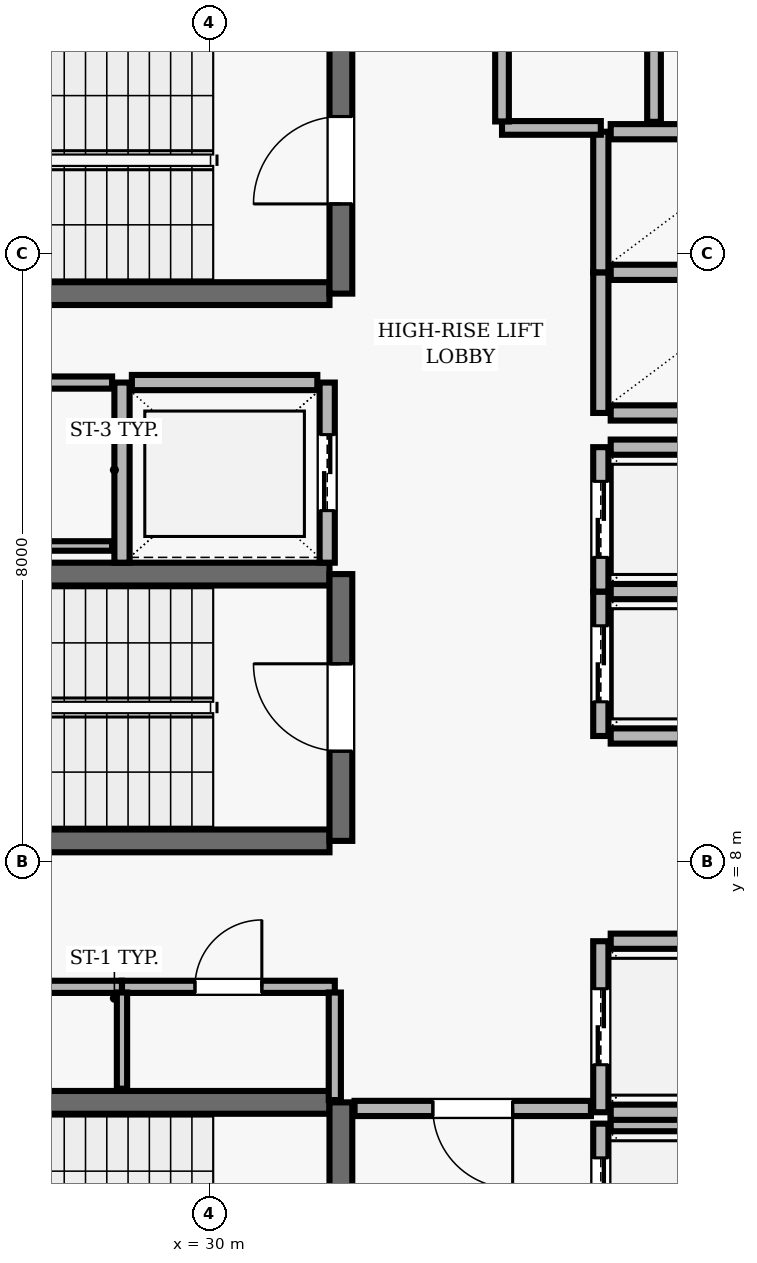
"""IFC4 building model, lengths in metres.
Left out: names, types, materials, properties, quantities, classifications, styles, units other than length and angle.
Written with IfcOpenShell. Run it as: python <this file> out.ifc"""

import sys

from ifc_helpers import new_model, si_unit, direction, frame, frame_2d, origin, place, context, subcontext, project, spatial, rectangle, extrude, element, fill, save


model = new_model("IFC4")
c1 = context("Model", 3, precision=1e-05, world=origin(), true_north=direction((0.0, 1.0)))
c2 = subcontext(c1, "Body", "Model", "MODEL_VIEW")
j1 = project(units=[si_unit("LENGTHUNIT", "METRE"), si_unit("PLANEANGLEUNIT", "RADIAN")], contexts=[c1])
p1 = place(None, origin())
s1 = spatial("IfcSite", under=j1, at=p1, CompositionType="ELEMENT")
p2 = place(p1, origin())
s2 = spatial("IfcBuilding", under=s1, at=p2, CompositionType="ELEMENT")
p3 = place(p2, frame((0.0, 0.0, 179.7)))
s3 = spatial("IfcBuildingStorey", under=s2, at=p3, CompositionType="ELEMENT", Elevation=179.7)
p4 = place(p3, frame((31.58, 4.83, 0.0), z_axis=(0.0, 0.0, 1.0), x_axis=(-1.0, 0.0, 0.0)))
e1 = element("IfcWall", 1, at=p4, inside=s3, PredefinedType="SHEAR", context=c2, shape_type="SweptSolid", body=[
    extrude(rectangle(XDim=8.36, YDim=0.3, at=frame_2d((4.18, 0.0))), origin(), (0.0, 0.0, 1.0), 3.69),
])
p5 = place(p3, frame((31.73, 0.96, 0.0), z_axis=(0.0, 0.0, 1.0), x_axis=(0.0, 1.0, 0.0)))
e2 = element("IfcWall", 2, at=p5, inside=s3, PredefinedType="SHEAR", context=c2, shape_type="SweptSolid", body=[
    extrude(rectangle(XDim=3.87, YDim=0.3, at=frame_2d((1.935, 0.0))), origin(), (0.0, 0.0, 1.0), 3.69),
])
p6 = place(p5, frame((1.54, 0.0, 0.0)))
e3 = element("IfcOpeningElement", 3, at=p6, cuts=e2, PredefinedType="OPENING", context=c2, shape_type="SweptSolid", body=[
    extrude(rectangle(XDim=1.15, YDim=2.15, at=frame_2d((0.575, 1.075))), frame((0.0, 0.16, 0.0), z_axis=(0.0, -1.0, 0.0), x_axis=(1.0, 0.0, 0.0)), (0.0, 0.0, 1.0), 0.32),
])
p7 = place(p3, frame((23.22, 15.47, 0.0), z_axis=(0.0, 0.0, 1.0), x_axis=(1.0, 0.0, 0.0)))
e4 = element("IfcWall", 4, at=p7, inside=s3, PredefinedType="SHEAR", context=c2, shape_type="SweptSolid", body=[
    extrude(rectangle(XDim=8.36, YDim=0.3, at=frame_2d((4.18, 0.0))), origin(), (0.0, 0.0, 1.0), 3.69),
])
p8 = place(p3, frame((31.73, 15.47, 0.0), z_axis=(0.0, 0.0, 1.0), x_axis=(0.0, 1.0, 0.0)))
e5 = element("IfcWall", 5, at=p8, inside=s3, PredefinedType="SHEAR", context=c2, shape_type="SweptSolid", body=[
    extrude(rectangle(XDim=3.51, YDim=0.3, at=frame_2d((1.755, 0.0))), origin(), (0.0, 0.0, 1.0), 3.69),
])
p9 = place(p8, frame((1.18, 0.0, 0.0)))
e6 = element("IfcOpeningElement", 6, at=p9, cuts=e5, PredefinedType="OPENING", context=c2, shape_type="SweptSolid", body=[
    extrude(rectangle(XDim=1.15, YDim=2.15, at=frame_2d((0.575, 1.075))), frame((0.0, 0.16, 0.0), z_axis=(0.0, -1.0, 0.0), x_axis=(1.0, 0.0, 0.0)), (0.0, 0.0, 1.0), 0.32),
])
for number, where, z_axis, x_axis in (
    (7, (31.58, 11.78, 0.0), (0.0, 0.0, 1.0), (-1.0, 0.0, 0.0)),
    (8, (23.22, 8.27, 0.0), (0.0, 0.0, 1.0), (1.0, 0.0, 0.0)),
):
    element("IfcWall", number, at=place(p3, frame(where, z_axis=z_axis, x_axis=x_axis)), inside=s3, PredefinedType="SHEAR", context=c2, shape_type="SweptSolid", body=[
        extrude(rectangle(XDim=8.36, YDim=0.3, at=frame_2d((4.18, 0.0))), origin(), (0.0, 0.0, 1.0), 3.69),
    ])
p10 = place(p3, frame((31.73, 8.27, 0.0), z_axis=(0.0, 0.0, 1.0), x_axis=(0.0, 1.0, 0.0)))
e9 = element("IfcWall", 9, at=p10, inside=s3, PredefinedType="SHEAR", context=c2, shape_type="SweptSolid", body=[
    extrude(rectangle(XDim=3.51, YDim=0.3, at=frame_2d((1.755, 0.0))), origin(), (0.0, 0.0, 1.0), 3.69),
])
p11 = place(p10, frame((1.18, 0.0, 0.0)))
e10 = element("IfcOpeningElement", 10, at=p11, cuts=e9, PredefinedType="OPENING", context=c2, shape_type="SweptSolid", body=[
    extrude(rectangle(XDim=1.15, YDim=2.15, at=frame_2d((0.575, 1.075))), frame((0.0, 0.16, 0.0), z_axis=(0.0, -1.0, 0.0), x_axis=(1.0, 0.0, 0.0)), (0.0, 0.0, 1.0), 0.32),
])
p12 = place(p3, frame((35.15, 4.55, 0.0), z_axis=(0.0, 0.0, 1.0), x_axis=(0.0, -1.0, 0.0)))
e11 = element("IfcWall", 11, at=p12, inside=s3, PredefinedType="SOLIDWALL", context=c2, shape_type="SweptSolid", body=[
    extrude(rectangle(XDim=2.1, YDim=0.2, at=frame_2d((1.05, 0.0))), origin(), (0.0, 0.0, 1.0), 3.69),
])
p13 = place(p12, frame((0.45, 0.0, 0.0)))
e12 = element("IfcOpeningElement", 12, at=p13, cuts=e11, PredefinedType="OPENING", context=c2, shape_type="SweptSolid", body=[
    extrude(rectangle(XDim=1.2, YDim=2.15, at=frame_2d((0.6, 1.075))), frame((0.0, 0.11, 0.0), z_axis=(0.0, -1.0, 0.0), x_axis=(1.0, 0.0, 0.0)), (0.0, 0.0, 1.0), 0.22),
])
p14 = place(p3, frame((37.42, 4.55, 0.0), z_axis=(0.0, 0.0, 1.0), x_axis=(-1.0, 0.0, 0.0)))
e13 = element("IfcWall", 13, at=p14, inside=s3, PredefinedType="SOLIDWALL", context=c2, shape_type="SweptSolid", body=[
    extrude(rectangle(XDim=2.14, YDim=0.2, at=frame_2d((1.07, 0.0))), origin(), (0.0, 0.0, 1.0), 3.69),
])
p15 = place(p3, frame((35.15, 6.95, 0.0), z_axis=(0.0, 0.0, 1.0), x_axis=(0.0, -1.0, 0.0)))
e14 = element("IfcWall", 14, at=p15, inside=s3, PredefinedType="SOLIDWALL", context=c2, shape_type="SweptSolid", body=[
    extrude(rectangle(XDim=2.25, YDim=0.2, at=frame_2d((1.125, 0.0))), origin(), (0.0, 0.0, 1.0), 3.69),
])
p16 = place(p15, frame((0.625, 0.0, 0.0)))
e15 = element("IfcOpeningElement", 15, at=p16, cuts=e14, PredefinedType="OPENING", context=c2, shape_type="SweptSolid", body=[
    extrude(rectangle(XDim=1.0, YDim=2.1, at=frame_2d((0.5, 1.05))), frame((0.0, 0.11, 0.0), z_axis=(0.0, -1.0, 0.0), x_axis=(1.0, 0.0, 0.0)), (0.0, 0.0, 1.0), 0.22),
])
for number, where, z_axis, x_axis in (
    (16, (35.28, 4.7, 0.0), (0.0, 0.0, 1.0), (1.0, 0.0, 0.0)),
    (17, (37.42, 6.95, 0.0), (0.0, 0.0, 1.0), (-1.0, 0.0, 0.0)),
):
    element("IfcWall", number, at=place(p3, frame(where, z_axis=z_axis, x_axis=x_axis)), inside=s3, PredefinedType="SOLIDWALL", context=c2, shape_type="SweptSolid", body=[
        extrude(rectangle(XDim=2.14, YDim=0.2, at=frame_2d((1.07, 0.0))), origin(), (0.0, 0.0, 1.0), 3.69),
    ])
p17 = place(p3, frame((35.15, 11.55, 0.0), z_axis=(0.0, 0.0, 1.0), x_axis=(0.0, -1.0, 0.0)))
e18 = element("IfcWall", 18, at=p17, inside=s3, PredefinedType="SOLIDWALL", context=c2, shape_type="SweptSolid", body=[
    extrude(rectangle(XDim=1.9, YDim=0.2, at=frame_2d((0.95, 0.0))), origin(), (0.0, 0.0, 1.0), 3.69),
])
p18 = place(p17, frame((0.45, 0.0, 0.0)))
e19 = element("IfcOpeningElement", 19, at=p18, cuts=e18, PredefinedType="OPENING", context=c2, shape_type="SweptSolid", body=[
    extrude(rectangle(XDim=1.0, YDim=2.1, at=frame_2d((0.5, 1.05))), frame((0.0, 0.11, 0.0), z_axis=(0.0, -1.0, 0.0), x_axis=(1.0, 0.0, 0.0)), (0.0, 0.0, 1.0), 0.22),
])
for number, where, z_axis, x_axis in (
    (20, (35.28, 9.65, 0.0), (0.0, 0.0, 1.0), (1.0, 0.0, 0.0)),
    (21, (37.42, 11.55, 0.0), (0.0, 0.0, 1.0), (-1.0, 0.0, 0.0)),
):
    element("IfcWall", number, at=place(p3, frame(where, z_axis=z_axis, x_axis=x_axis)), inside=s3, PredefinedType="SOLIDWALL", context=c2, shape_type="SweptSolid", body=[
        extrude(rectangle(XDim=2.14, YDim=0.2, at=frame_2d((1.07, 0.0))), origin(), (0.0, 0.0, 1.0), 3.69),
    ])
p19 = place(p3, frame((35.15, 13.45, 0.0), z_axis=(0.0, 0.0, 1.0), x_axis=(0.0, -1.0, 0.0)))
e22 = element("IfcWall", 22, at=p19, inside=s3, PredefinedType="SOLIDWALL", context=c2, shape_type="SweptSolid", body=[
    extrude(rectangle(XDim=1.9, YDim=0.2, at=frame_2d((0.95, 0.0))), origin(), (0.0, 0.0, 1.0), 3.69),
])
p20 = place(p19, frame((0.45, 0.0, 0.0)))
e23 = element("IfcOpeningElement", 23, at=p20, cuts=e22, PredefinedType="OPENING", context=c2, shape_type="SweptSolid", body=[
    extrude(rectangle(XDim=1.0, YDim=2.1, at=frame_2d((0.5, 1.05))), frame((0.0, 0.11, 0.0), z_axis=(0.0, -1.0, 0.0), x_axis=(1.0, 0.0, 0.0)), (0.0, 0.0, 1.0), 0.22),
])
p21 = place(p3, frame((37.42, 13.45, 0.0), z_axis=(0.0, 0.0, 1.0), x_axis=(-1.0, 0.0, 0.0)))
e24 = element("IfcWall", 24, at=p21, inside=s3, PredefinedType="SOLIDWALL", context=c2, shape_type="SweptSolid", body=[
    extrude(rectangle(XDim=2.14, YDim=0.2, at=frame_2d((1.07, 0.0))), origin(), (0.0, 0.0, 1.0), 3.69),
])
p22 = place(p3, frame((28.85, 14.3, 0.0), z_axis=(0.0, 0.0, 1.0), x_axis=(0.0, -1.0, 0.0)))
e25 = element("IfcWall", 25, at=p22, inside=s3, PredefinedType="SOLIDWALL", context=c2, shape_type="SweptSolid", body=[
    extrude(rectangle(XDim=2.37, YDim=0.2, at=frame_2d((1.185, 0.0))), origin(), (0.0, 0.0, 1.0), 3.69),
])
p23 = place(p3, frame((31.55, 11.93, 0.0), z_axis=(0.0, 0.0, 1.0), x_axis=(0.0, 1.0, 0.0)))
e26 = element("IfcWall", 26, at=p23, inside=s3, PredefinedType="SOLIDWALL", context=c2, shape_type="SweptSolid", body=[
    extrude(rectangle(XDim=2.37, YDim=0.2, at=frame_2d((1.185, 0.0))), origin(), (0.0, 0.0, 1.0), 3.69),
])
p24 = place(p23, frame((0.685, 0.0, 0.0)))
e27 = element("IfcOpeningElement", 27, at=p24, cuts=e26, PredefinedType="OPENING", context=c2, shape_type="SweptSolid", body=[
    extrude(rectangle(XDim=1.0, YDim=2.1, at=frame_2d((0.5, 1.05))), frame((0.0, 0.11, 0.0), z_axis=(0.0, -1.0, 0.0), x_axis=(1.0, 0.0, 0.0)), (0.0, 0.0, 1.0), 0.22),
])
p25 = place(p3, frame((31.42, 14.3, 0.0), z_axis=(0.0, 0.0, 1.0), x_axis=(-1.0, 0.0, 0.0)))
e28 = element("IfcWall", 28, at=p25, inside=s3, PredefinedType="SOLIDWALL", context=c2, shape_type="SweptSolid", body=[
    extrude(rectangle(XDim=2.44, YDim=0.2, at=frame_2d((1.22, 0.0))), origin(), (0.0, 0.0, 1.0), 3.69),
])
p26 = place(p3, frame((35.15, 15.75, 0.0), z_axis=(0.0, 0.0, 1.0), x_axis=(0.0, -1.0, 0.0)))
e29 = element("IfcWall", 29, at=p26, inside=s3, PredefinedType="SOLIDWALL", context=c2, shape_type="SweptSolid", body=[
    extrude(rectangle(XDim=1.85, YDim=0.2, at=frame_2d((0.925, 0.0))), origin(), (0.0, 0.0, 1.0), 3.69),
])
for number, where, z_axis, x_axis in (
    (30, (35.28, 13.9, 0.0), (0.0, 0.0, 1.0), (1.0, 0.0, 0.0)),
    (31, (37.42, 15.75, 0.0), (0.0, 0.0, 1.0), (-1.0, 0.0, 0.0)),
):
    element("IfcWall", number, at=place(p3, frame(where, z_axis=z_axis, x_axis=x_axis)), inside=s3, PredefinedType="SOLIDWALL", context=c2, shape_type="SweptSolid", body=[
        extrude(rectangle(XDim=2.14, YDim=0.2, at=frame_2d((1.07, 0.0))), origin(), (0.0, 0.0, 1.0), 3.69),
    ])
p27 = place(p3, frame((35.15, 17.6, 0.0), z_axis=(0.0, 0.0, 1.0), x_axis=(0.0, -1.0, 0.0)))
e32 = element("IfcWall", 32, at=p27, inside=s3, PredefinedType="SOLIDWALL", context=c2, shape_type="SweptSolid", body=[
    extrude(rectangle(XDim=1.85, YDim=0.2, at=frame_2d((0.925, 0.0))), origin(), (0.0, 0.0, 1.0), 3.69),
])
p28 = place(p3, frame((37.42, 17.6, 0.0), z_axis=(0.0, 0.0, 1.0), x_axis=(-1.0, 0.0, 0.0)))
e33 = element("IfcWall", 33, at=p28, inside=s3, PredefinedType="SOLIDWALL", context=c2, shape_type="SweptSolid", body=[
    extrude(rectangle(XDim=2.14, YDim=0.2, at=frame_2d((1.07, 0.0))), origin(), (0.0, 0.0, 1.0), 3.69),
])
p29 = place(p3, frame((24.35, 12.15, 0.0), z_axis=(0.0, 0.0, 1.0), x_axis=(1.0, 0.0, 0.0)))
e34 = element("IfcWall", 34, at=p29, inside=s3, PredefinedType="PARTITIONING", context=c2, shape_type="SweptSolid", body=[
    extrude(rectangle(XDim=4.37, YDim=0.125, at=frame_2d((2.185, 0.0))), origin(), (0.0, 0.0, 1.0), 3.69),
])
p30 = place(p3, frame((24.35, 14.3, 0.0), z_axis=(0.0, 0.0, 1.0), x_axis=(1.0, 0.0, 0.0)))
e35 = element("IfcWall", 35, at=p30, inside=s3, PredefinedType="PARTITIONING", context=c2, shape_type="SweptSolid", body=[
    extrude(rectangle(XDim=4.37, YDim=0.16, at=frame_2d((2.185, 0.0))), origin(), (0.0, 0.0, 1.0), 3.69),
])
p31 = place(p30, frame((1.735, 0.0, 0.0)))
e36 = element("IfcOpeningElement", 36, at=p31, cuts=e35, PredefinedType="OPENING", context=c2, shape_type="SweptSolid", body=[
    extrude(rectangle(XDim=0.9, YDim=2.1, at=frame_2d((0.45, 1.05))), frame((0.0, 0.09, 0.0), z_axis=(0.0, -1.0, 0.0), x_axis=(1.0, 0.0, 0.0)), (0.0, 0.0, 1.0), 0.18),
])
p32 = place(p3, frame((26.0, 6.35, 0.0), z_axis=(0.0, 0.0, 1.0), x_axis=(1.0, 0.0, 0.0)))
e37 = element("IfcWall", 37, at=p32, inside=s3, PredefinedType="PARTITIONING", context=c2, shape_type="SweptSolid", body=[
    extrude(rectangle(XDim=2.85, YDim=0.16, at=frame_2d((1.425, 0.0))), origin(), (0.0, 0.0, 1.0), 3.69),
])
p33 = place(p32, frame((0.985, 0.0, 0.0)))
e38 = element("IfcOpeningElement", 38, at=p33, cuts=e37, PredefinedType="OPENING", context=c2, shape_type="SweptSolid", body=[
    extrude(rectangle(XDim=0.88, YDim=2.1, at=frame_2d((0.44, 1.05))), frame((0.0, 0.09, 0.0), z_axis=(0.0, -1.0, 0.0), x_axis=(1.0, 0.0, 0.0)), (0.0, 0.0, 1.0), 0.18),
])
p34 = place(p3, frame((28.85, 6.35, 0.0), z_axis=(0.0, 0.0, 1.0), x_axis=(1.0, 0.0, 0.0)))
e39 = element("IfcWall", 39, at=p34, inside=s3, PredefinedType="PARTITIONING", context=c2, shape_type="SweptSolid", body=[
    extrude(rectangle(XDim=2.8, YDim=0.16, at=frame_2d((1.4, 0.0))), origin(), (0.0, 0.0, 1.0), 3.69),
])
p35 = place(p34, frame((0.96, 0.0, 0.0)))
e40 = element("IfcOpeningElement", 40, at=p35, cuts=e39, PredefinedType="OPENING", context=c2, shape_type="SweptSolid", body=[
    extrude(rectangle(XDim=0.88, YDim=2.1, at=frame_2d((0.44, 1.05))), frame((0.0, 0.09, 0.0), z_axis=(0.0, -1.0, 0.0), x_axis=(1.0, 0.0, 0.0)), (0.0, 0.0, 1.0), 0.18),
])
p36 = place(p3, frame((33.85, 17.65, 0.0), z_axis=(0.0, 0.0, 1.0), x_axis=(1.0, 0.0, 0.0)))
e41 = element("IfcWall", 41, at=p36, inside=s3, PredefinedType="PARTITIONING", context=c2, shape_type="SweptSolid", body=[
    extrude(rectangle(XDim=1.3, YDim=0.18, at=frame_2d((0.65, 0.0))), origin(), (0.0, 0.0, 1.0), 3.69),
])
p37 = place(p3, frame((35.02, 4.75, 0.0), z_axis=(0.0, 0.0, 1.0), x_axis=(-1.0, 0.0, 0.0)))
e42 = element("IfcWall", 42, at=p37, inside=s3, PredefinedType="SOLIDWALL", context=c2, shape_type="SweptSolid", body=[
    extrude(rectangle(XDim=3.11, YDim=0.2, at=frame_2d((1.555, 0.0))), origin(), (0.0, 0.0, 1.0), 3.69),
])
p38 = place(p37, frame((1.03, 0.0, 0.0)))
e43 = element("IfcOpeningElement", 43, at=p38, cuts=e42, PredefinedType="OPENING", context=c2, shape_type="SweptSolid", body=[
    extrude(rectangle(XDim=1.05, YDim=2.15, at=frame_2d((0.525, 1.075))), frame((0.0, 0.11, 0.0), z_axis=(0.0, -1.0, 0.0), x_axis=(1.0, 0.0, 0.0)), (0.0, 0.0, 1.0), 0.22),
])
p39 = place(p3, frame((28.85, 5.01, 0.0), z_axis=(0.0, 0.0, 1.0), x_axis=(0.0, 1.0, 0.0)))
e44 = element("IfcWall", 44, at=p39, inside=s3, PredefinedType="PARTITIONING", context=c2, shape_type="SweptSolid", body=[
    extrude(rectangle(XDim=1.265, YDim=0.135, at=frame_2d((0.632, 0.0))), origin(), (0.0, 0.0, 1.0), 3.69),
])
p40 = place(p3, frame((31.65, 4.86, 0.0), z_axis=(0.0, 0.0, 1.0), x_axis=(0.0, 1.0, 0.0)))
e45 = element("IfcWall", 45, at=p40, inside=s3, PredefinedType="PARTITIONING", context=c2, shape_type="SweptSolid", body=[
    extrude(rectangle(XDim=1.415, YDim=0.16, at=frame_2d((0.708, 0.0))), origin(), (0.0, 0.0, 1.0), 3.69),
])
p41 = place(p3, frame((33.85, 17.735, 0.0), z_axis=(0.0, 0.0, 1.0), x_axis=(0.0, 1.0, 0.0)))
e46 = element("IfcWall", 46, at=p41, inside=s3, PredefinedType="PARTITIONING", context=c2, shape_type="SweptSolid", body=[
    extrude(rectangle(XDim=6.03, YDim=0.18, at=frame_2d((3.015, 0.0))), origin(), (0.0, 0.0, 1.0), 3.69),
])
p42 = place(p41, frame((2.54, 0.0, 0.0)))
e47 = element("IfcOpeningElement", 47, at=p42, cuts=e46, PredefinedType="OPENING", context=c2, shape_type="SweptSolid", body=[
    extrude(rectangle(XDim=0.95, YDim=2.1, at=frame_2d((0.475, 1.05))), frame((0.0, 0.1, 0.0), z_axis=(0.0, -1.0, 0.0), x_axis=(1.0, 0.0, 0.0)), (0.0, 0.0, 1.0), 0.2),
])
p43 = place(p3, frame((35.85, 17.73, 0.0), z_axis=(0.0, 0.0, 1.0), x_axis=(0.0, 1.0, 0.0)))
e48 = element("IfcWall", 48, at=p43, inside=s3, PredefinedType="PARTITIONING", context=c2, shape_type="SweptSolid", body=[
    extrude(rectangle(XDim=3.412, YDim=0.18, at=frame_2d((1.706, 0.0))), origin(), (0.0, 0.0, 1.0), 3.69),
])
p44 = place(p43, frame((1.256, 0.0, 0.0)))
e49 = element("IfcOpeningElement", 49, at=p44, cuts=e48, PredefinedType="OPENING", context=c2, shape_type="SweptSolid", body=[
    extrude(rectangle(XDim=0.9, YDim=2.1, at=frame_2d((0.45, 1.05))), frame((0.0, 0.1, 0.0), z_axis=(0.0, -1.0, 0.0), x_axis=(1.0, 0.0, 0.0)), (0.0, 0.0, 1.0), 0.2),
])
p45 = place(p9, origin())
e50 = element("IfcDoor", 50, at=p45, inside=s3, OperationType="SINGLE_SWING_LEFT", PredefinedType="DOOR", context=c2, shape_type="SweptSolid", body=[
    extrude(rectangle(XDim=1.15, YDim=2.15, at=frame_2d((0.575, 1.075))), frame((0.0, 0.025, 0.0), z_axis=(0.0, -1.0, 0.0), x_axis=(1.0, 0.0, 0.0)), (0.0, 0.0, 1.0), 0.05),
])
fill(e6, e50)
p46 = place(p11, origin())
e51 = element("IfcDoor", 51, at=p46, inside=s3, OperationType="SINGLE_SWING_RIGHT", PredefinedType="DOOR", context=c2, shape_type="SweptSolid", body=[
    extrude(rectangle(XDim=1.15, YDim=2.15, at=frame_2d((0.575, 1.075))), frame((0.0, 0.025, 0.0), z_axis=(0.0, -1.0, 0.0), x_axis=(1.0, 0.0, 0.0)), (0.0, 0.0, 1.0), 0.05),
])
fill(e10, e51)
p47 = place(p13, origin())
e52 = element("IfcDoor", 52, at=p47, inside=s3, OperationType="DOUBLE_DOOR_SLIDING", PredefinedType="DOOR", context=c2, shape_type="SweptSolid", body=[
    extrude(rectangle(XDim=1.2, YDim=2.15, at=frame_2d((0.6, 1.075))), frame((0.0, 0.025, 0.0), z_axis=(0.0, -1.0, 0.0), x_axis=(1.0, 0.0, 0.0)), (0.0, 0.0, 1.0), 0.05),
])
fill(e12, e52)
p48 = place(p16, origin())
e53 = element("IfcDoor", 53, at=p48, inside=s3, OperationType="DOUBLE_DOOR_SLIDING", PredefinedType="DOOR", context=c2, shape_type="SweptSolid", body=[
    extrude(rectangle(XDim=1.0, YDim=2.1, at=frame_2d((0.5, 1.05))), frame((0.0, 0.025, 0.0), z_axis=(0.0, -1.0, 0.0), x_axis=(1.0, 0.0, 0.0)), (0.0, 0.0, 1.0), 0.05),
])
fill(e15, e53)
p49 = place(p18, origin())
e54 = element("IfcDoor", 54, at=p49, inside=s3, OperationType="DOUBLE_DOOR_SLIDING", PredefinedType="DOOR", context=c2, shape_type="SweptSolid", body=[
    extrude(rectangle(XDim=1.0, YDim=2.1, at=frame_2d((0.5, 1.05))), frame((0.0, 0.025, 0.0), z_axis=(0.0, -1.0, 0.0), x_axis=(1.0, 0.0, 0.0)), (0.0, 0.0, 1.0), 0.05),
])
fill(e19, e54)
p50 = place(p20, origin())
e55 = element("IfcDoor", 55, at=p50, inside=s3, OperationType="DOUBLE_DOOR_SLIDING", PredefinedType="DOOR", context=c2, shape_type="SweptSolid", body=[
    extrude(rectangle(XDim=1.0, YDim=2.1, at=frame_2d((0.5, 1.05))), frame((0.0, 0.025, 0.0), z_axis=(0.0, -1.0, 0.0), x_axis=(1.0, 0.0, 0.0)), (0.0, 0.0, 1.0), 0.05),
])
fill(e23, e55)
p51 = place(p24, origin())
e56 = element("IfcDoor", 56, at=p51, inside=s3, OperationType="DOUBLE_DOOR_SLIDING", PredefinedType="DOOR", context=c2, shape_type="SweptSolid", body=[
    extrude(rectangle(XDim=1.0, YDim=2.1, at=frame_2d((0.5, 1.05))), frame((0.0, 0.025, 0.0), z_axis=(0.0, -1.0, 0.0), x_axis=(1.0, 0.0, 0.0)), (0.0, 0.0, 1.0), 0.05),
])
fill(e27, e56)
p52 = place(p38, origin())
e57 = element("IfcDoor", 57, at=p52, inside=s3, OperationType="SINGLE_SWING_LEFT", PredefinedType="DOOR", context=c2, shape_type="SweptSolid", body=[
    extrude(rectangle(XDim=1.05, YDim=2.15, at=frame_2d((0.525, 1.075))), frame((0.0, 0.025, 0.0), z_axis=(0.0, -1.0, 0.0), x_axis=(1.0, 0.0, 0.0)), (0.0, 0.0, 1.0), 0.05),
])
fill(e43, e57)
p53 = place(p35, origin())
e58 = element("IfcDoor", 58, at=p53, inside=s3, OperationType="SINGLE_SWING_RIGHT", PredefinedType="DOOR", context=c2, shape_type="SweptSolid", body=[
    extrude(rectangle(XDim=0.88, YDim=2.1, at=frame_2d((0.44, 1.05))), frame((0.0, 0.025, 0.0), z_axis=(0.0, -1.0, 0.0), x_axis=(1.0, 0.0, 0.0)), (0.0, 0.0, 1.0), 0.05),
])
fill(e40, e58)
save(model, sys.argv[1])
